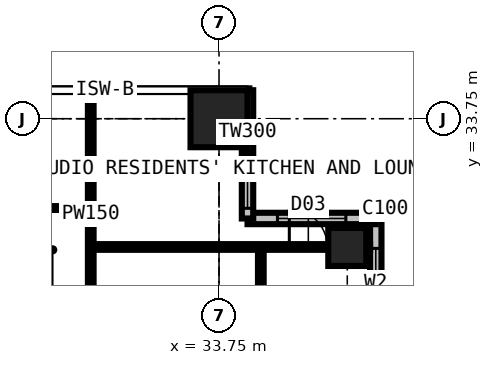
"""IFC4 building model, lengths in metres.
Left out: names, types, materials, properties, quantities, classifications, styles, units other than length and angle.
Written with IfcOpenShell. Run it as: python <this file> out.ifc"""

import sys

from ifc_helpers import new_model, si_unit, direction, frame, frame_2d, origin, origin_2d, place, context, subcontext, project, spatial, rectangle, extrude, element, fill, save


model = new_model("IFC4")
c1 = context("Model", 3, precision=1e-05, world=origin(), true_north=direction((0.0, 1.0)))
c2 = subcontext(c1, "Body", "Model", "MODEL_VIEW")
j1 = project(units=[si_unit("LENGTHUNIT", "METRE"), si_unit("PLANEANGLEUNIT", "RADIAN")], contexts=[c1])
p1 = place(None, origin())
s1 = spatial("IfcSite", under=j1, at=p1, CompositionType="ELEMENT")
p2 = place(p1, origin())
s2 = spatial("IfcBuilding", under=s1, at=p2, CompositionType="ELEMENT")
p3 = place(p2, frame((0.0, 0.0, 112.5)))
s3 = spatial("IfcBuildingStorey", under=s2, at=p3, CompositionType="ELEMENT", Elevation=112.5)
p4 = place(p3, frame((33.75, 33.75, 0.0), z_axis=(0.0, 0.0, 1.0), x_axis=(1.0, 0.0, 0.0)))
e1 = element("IfcColumn", 1, at=p4, inside=s3, PredefinedType="COLUMN", context=c2, shape_type="SweptSolid", body=[
    extrude(rectangle(XDim=1.5, YDim=1.5, at=origin_2d()), origin(), (0.0, 0.0, 1.0), 3.6),
])
p5 = place(p3, frame((37.125, 30.375, 0.0), z_axis=(0.0, 0.0, 1.0), x_axis=(1.0, 0.0, 0.0)))
e2 = element("IfcColumn", 2, at=p5, inside=s3, PredefinedType="COLUMN", context=c2, shape_type="SweptSolid", body=[
    extrude(rectangle(XDim=1.0, YDim=1.0, at=origin_2d()), origin(), (0.0, 0.0, 1.0), 3.6),
])
p6 = place(p3, frame((37.875, 27.75, 0.0), z_axis=(0.0, 0.0, 1.0), x_axis=(0.0, 1.0, 0.0)))
e3 = element("IfcWall", 3, at=p6, inside=s3, PredefinedType="SOLIDWALL", context=c2, shape_type="SweptSolid", body=[
    extrude(rectangle(XDim=3.375, YDim=0.3, at=frame_2d((1.688, 0.0))), origin(), (0.0, 0.0, 1.0), 3.375),
])
p7 = place(p6, frame((0.788, 0.0, 0.6)))
e4 = element("IfcOpeningElement", 4, at=p7, cuts=e3, PredefinedType="OPENING", context=c2, shape_type="SweptSolid", body=[
    extrude(rectangle(XDim=1.8, YDim=2.1, at=frame_2d((0.9, 1.05))), frame((0.0, 0.16, 0.0), z_axis=(0.0, -1.0, 0.0), x_axis=(1.0, 0.0, 0.0)), (0.0, 0.0, 1.0), 0.32),
])
p8 = place(p3, frame((37.875, 31.125, 0.0), z_axis=(0.0, 0.0, 1.0), x_axis=(-1.0, 0.0, 0.0)))
e5 = element("IfcWall", 5, at=p8, inside=s3, PredefinedType="SOLIDWALL", context=c2, shape_type="SweptSolid", body=[
    extrude(rectangle(XDim=3.375, YDim=0.3, at=frame_2d((1.688, 0.0))), origin(), (0.0, 0.0, 1.0), 3.375),
])
p9 = place(p8, frame((0.788, 0.0, 0.6)))
e6 = element("IfcOpeningElement", 6, at=p9, cuts=e5, PredefinedType="OPENING", context=c2, shape_type="SweptSolid", body=[
    extrude(rectangle(XDim=1.8, YDim=2.1, at=frame_2d((0.9, 1.05))), frame((0.0, 0.16, 0.0), z_axis=(0.0, -1.0, 0.0), x_axis=(1.0, 0.0, 0.0)), (0.0, 0.0, 1.0), 0.32),
])
p10 = place(p3, frame((34.5, 31.125, 0.0), z_axis=(0.0, 0.0, 1.0), x_axis=(0.0, 1.0, 0.0)))
e7 = element("IfcWall", 7, at=p10, inside=s3, PredefinedType="SOLIDWALL", context=c2, shape_type="SweptSolid", body=[
    extrude(rectangle(XDim=3.375, YDim=0.3, at=frame_2d((1.688, 0.0))), origin(), (0.0, 0.0, 1.0), 3.375),
])
p11 = place(p10, frame((0.268, 0.0, 0.9)))
e8 = element("IfcOpeningElement", 8, at=p11, cuts=e7, PredefinedType="OPENING", context=c2, shape_type="SweptSolid", body=[
    extrude(rectangle(XDim=1.5, YDim=1.8, at=frame_2d((0.75, 0.9))), frame((0.0, 0.16, 0.0), z_axis=(0.0, -1.0, 0.0), x_axis=(1.0, 0.0, 0.0)), (0.0, 0.0, 1.0), 0.32),
])
p12 = place(p3, frame((28.375, 31.4, 0.0), z_axis=(0.0, 0.0, 1.0), x_axis=(1.0, 0.0, 0.0)))
e9 = element("IfcWall", 9, at=p12, inside=s3, PredefinedType="PARTITIONING", context=c2, shape_type="SweptSolid", body=[
    extrude(rectangle(XDim=2.0, YDim=0.1, at=frame_2d((1.0, 0.0))), origin(), (0.0, 0.0, 1.0), 3.375),
])
p13 = place(p3, frame((30.375, 29.2, 0.0), z_axis=(0.0, 0.0, 1.0), x_axis=(0.0, 1.0, 0.0)))
e10 = element("IfcWall", 10, at=p13, inside=s3, PredefinedType="PARTITIONING", context=c2, shape_type="SweptSolid", body=[
    extrude(rectangle(XDim=5.284, YDim=0.15, at=frame_2d((2.642, 0.0))), origin(), (0.0, 0.0, 1.0), 3.375),
])
p14 = place(p3, frame((30.375, 30.375, 0.0), z_axis=(0.0, 0.0, 1.0), x_axis=(1.0, 0.0, 0.0)))
e11 = element("IfcWall", 11, at=p14, inside=s3, PredefinedType="PARTITIONING", context=c2, shape_type="SweptSolid", body=[
    extrude(rectangle(XDim=7.35, YDim=0.15, at=frame_2d((3.675, 0.0))), origin(), (0.0, 0.0, 1.0), 2.877),
])
p15 = place(p14, frame((5.225, 0.0, 0.0)))
e12 = element("IfcOpeningElement", 12, at=p15, cuts=e11, PredefinedType="OPENING", context=c2, shape_type="SweptSolid", body=[
    extrude(rectangle(XDim=1.0, YDim=2.2, at=frame_2d((0.5, 1.1))), frame((0.0, 0.085, 0.0), z_axis=(0.0, -1.0, 0.0), x_axis=(1.0, 0.0, 0.0)), (0.0, 0.0, 1.0), 0.17),
])
p16 = place(p3, frame((34.85, 12.55, 0.0), z_axis=(0.0, 0.0, 1.0), x_axis=(0.0, 1.0, 0.0)))
e13 = element("IfcWall", 13, at=p16, inside=s3, PredefinedType="PARTITIONING", context=c2, shape_type="SweptSolid", body=[
    extrude(rectangle(XDim=17.825, YDim=0.15, at=frame_2d((8.913, 0.0))), origin(), (0.0, 0.0, 1.0), 3.375),
])
p17 = place(p16, frame((8.5, 0.0, 0.0)))
e14 = element("IfcOpeningElement", 14, at=p17, cuts=e13, PredefinedType="OPENING", context=c2, shape_type="SweptSolid", body=[
    extrude(rectangle(XDim=0.95, YDim=2.2, at=frame_2d((0.475, 1.1))), frame((0.0, 0.085, 0.0), z_axis=(0.0, -1.0, 0.0), x_axis=(1.0, 0.0, 0.0)), (0.0, 0.0, 1.0), 0.17),
])
p18 = place(p7, origin())
e15 = element("IfcWindow", 15, at=p18, inside=s3, PartitioningType="SINGLE_PANEL", PredefinedType="WINDOW", context=c2, shape_type="SweptSolid", body=[
    extrude(rectangle(XDim=1.8, YDim=2.1, at=frame_2d((0.9, 1.05))), frame((0.0, 0.03, 0.0), z_axis=(0.0, -1.0, 0.0), x_axis=(1.0, 0.0, 0.0)), (0.0, 0.0, 1.0), 0.06),
])
fill(e4, e15)
p19 = place(p9, origin())
e16 = element("IfcWindow", 16, at=p19, inside=s3, PartitioningType="SINGLE_PANEL", PredefinedType="WINDOW", context=c2, shape_type="SweptSolid", body=[
    extrude(rectangle(XDim=1.8, YDim=2.1, at=frame_2d((0.9, 1.05))), frame((0.0, 0.03, 0.0), z_axis=(0.0, -1.0, 0.0), x_axis=(1.0, 0.0, 0.0)), (0.0, 0.0, 1.0), 0.06),
])
fill(e6, e16)
p20 = place(p11, origin())
e17 = element("IfcWindow", 17, at=p20, inside=s3, PartitioningType="SINGLE_PANEL", PredefinedType="WINDOW", context=c2, shape_type="SweptSolid", body=[
    extrude(rectangle(XDim=1.5, YDim=1.8, at=frame_2d((0.75, 0.9))), frame((0.0, 0.03, 0.0), z_axis=(0.0, -1.0, 0.0), x_axis=(1.0, 0.0, 0.0)), (0.0, 0.0, 1.0), 0.06),
])
fill(e8, e17)
p21 = place(p15, origin())
e18 = element("IfcDoor", 18, at=p21, inside=s3, OperationType="SINGLE_SWING_LEFT", PredefinedType="DOOR", context=c2, shape_type="SweptSolid", body=[
    extrude(rectangle(XDim=1.0, YDim=2.2, at=frame_2d((0.5, 1.1))), frame((0.0, 0.025, 0.0), z_axis=(0.0, -1.0, 0.0), x_axis=(1.0, 0.0, 0.0)), (0.0, 0.0, 1.0), 0.05),
])
fill(e12, e18)
save(model, sys.argv[1])
